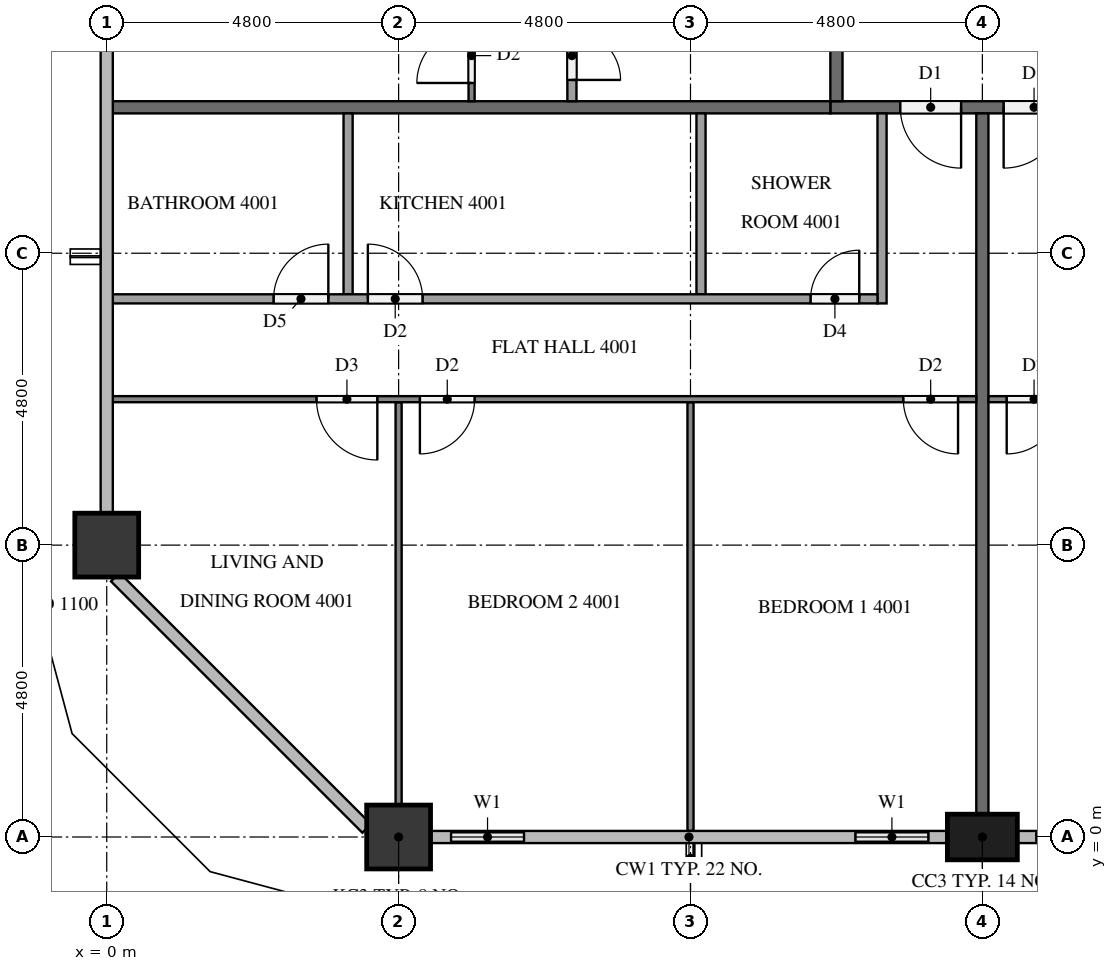
"""IFC4 building model, lengths in metres.
Left out: names, types, materials, properties, quantities, classifications, styles, units other than length and angle.
Written with IfcOpenShell. Run it as: python <this file> out.ifc"""

import sys

from ifc_helpers import new_model, si_unit, direction, frame, frame_2d, origin, origin_2d, place, context, subcontext, project, spatial, rectangle, extrude, element, fill, save


model = new_model("IFC4")
c1 = context("Model", 3, precision=1e-05, world=origin(), true_north=direction((0.0, 1.0)))
c2 = subcontext(c1, "Body", "Model", "MODEL_VIEW")
j1 = project(units=[si_unit("LENGTHUNIT", "METRE"), si_unit("PLANEANGLEUNIT", "RADIAN")], contexts=[c1])
p1 = place(None, origin())
s1 = spatial("IfcSite", under=j1, at=p1, CompositionType="ELEMENT")
p2 = place(p1, origin())
s2 = spatial("IfcBuilding", under=s1, at=p2, CompositionType="ELEMENT")
p3 = place(p2, frame((0.0, 0.0, 156.0)))
s3 = spatial("IfcBuildingStorey", under=s2, at=p3, CompositionType="ELEMENT", Elevation=156.0)
p4 = place(p3, frame((4.8, 0.0, 0.0), z_axis=(0.0, 0.0, 1.0), x_axis=(1.0, 0.0, 0.0)))
e1 = element("IfcColumn", 1, at=p4, inside=s3, PredefinedType="COLUMN", context=c2, shape_type="SweptSolid", body=[
    extrude(rectangle(XDim=1.05, YDim=1.05, at=origin_2d()), origin(), (0.0, 0.0, 1.0), 3.2),
])
p5 = place(p3, frame((14.4, 0.0, 0.0), z_axis=(0.0, 0.0, 1.0), x_axis=(1.0, 0.0, 0.0)))
e2 = element("IfcColumn", 2, at=p5, inside=s3, PredefinedType="COLUMN", context=c2, shape_type="SweptSolid", body=[
    extrude(rectangle(XDim=1.15, YDim=0.75, at=origin_2d()), origin(), (0.0, 0.0, 1.0), 3.2),
])
p6 = place(p3, frame((0.0, 4.8, 0.0), z_axis=(0.0, 0.0, 1.0), x_axis=(1.0, 0.0, 0.0)))
e3 = element("IfcColumn", 3, at=p6, inside=s3, PredefinedType="COLUMN", context=c2, shape_type="SweptSolid", body=[
    extrude(rectangle(XDim=1.05, YDim=1.05, at=origin_2d()), origin(), (0.0, 0.0, 1.0), 3.2),
])
p7 = place(p3, frame((5.325, 0.0, 0.0), z_axis=(0.0, 0.0, 1.0), x_axis=(1.0, 0.0, 0.0)))
e4 = element("IfcWall", 4, at=p7, inside=s3, PredefinedType="SOLIDWALL", context=c2, shape_type="SweptSolid", body=[
    extrude(rectangle(XDim=1.875, YDim=0.15, at=frame_2d((0.938, 0.0))), origin(), (0.0, 0.0, 1.0), 3.2),
])
p8 = place(p7, frame((0.337, 0.0, 0.9)))
e5 = element("IfcOpeningElement", 5, at=p8, cuts=e4, PredefinedType="OPENING", context=c2, shape_type="SweptSolid", body=[
    extrude(rectangle(XDim=1.2, YDim=1.4, at=frame_2d((0.6, 0.7))), frame((0.0, 0.085, 0.0), z_axis=(0.0, -1.0, 0.0), x_axis=(1.0, 0.0, 0.0)), (0.0, 0.0, 1.0), 0.17),
])
p9 = place(p3, frame((12.0, 0.0, 0.0), z_axis=(0.0, 0.0, 1.0), x_axis=(1.0, 0.0, 0.0)))
e6 = element("IfcWall", 6, at=p9, inside=s3, PredefinedType="SOLIDWALL", context=c2, shape_type="SweptSolid", body=[
    extrude(rectangle(XDim=1.825, YDim=0.15, at=frame_2d((0.913, 0.0))), origin(), (0.0, 0.0, 1.0), 3.2),
])
p10 = place(p9, frame((0.312, 0.0, 0.9)))
e7 = element("IfcOpeningElement", 7, at=p10, cuts=e6, PredefinedType="OPENING", context=c2, shape_type="SweptSolid", body=[
    extrude(rectangle(XDim=1.2, YDim=1.4, at=frame_2d((0.6, 0.7))), frame((0.0, 0.085, 0.0), z_axis=(0.0, -1.0, 0.0), x_axis=(1.0, 0.0, 0.0)), (0.0, 0.0, 1.0), 0.17),
])
p11 = place(p3, frame((14.975, 0.0, 0.0), z_axis=(0.0, 0.0, 1.0), x_axis=(1.0, 0.0, 0.0)))
e8 = element("IfcWall", 8, at=p11, inside=s3, PredefinedType="SOLIDWALL", context=c2, shape_type="SweptSolid", body=[
    extrude(rectangle(XDim=1.825, YDim=0.15, at=frame_2d((0.913, 0.0))), origin(), (0.0, 0.0, 1.0), 3.2),
])
p12 = place(p11, frame((0.312, 0.0, 0.9)))
e9 = element("IfcOpeningElement", 9, at=p12, cuts=e8, PredefinedType="OPENING", context=c2, shape_type="SweptSolid", body=[
    extrude(rectangle(XDim=1.2, YDim=1.4, at=frame_2d((0.6, 0.7))), frame((0.0, 0.085, 0.0), z_axis=(0.0, -1.0, 0.0), x_axis=(1.0, 0.0, 0.0)), (0.0, 0.0, 1.0), 0.17),
])
p13 = place(p3, frame((50.5, 12.0, 0.0), z_axis=(0.0, 0.0, 1.0), x_axis=(-1.0, 0.0, 0.0)))
e10 = element("IfcWall", 10, at=p13, inside=s3, PredefinedType="PARTITIONING", context=c2, shape_type="SweptSolid", body=[
    extrude(rectangle(XDim=38.6, YDim=0.2, at=frame_2d((19.3, 0.0))), origin(), (0.0, 0.0, 1.0), 3.2),
])
p14 = place(p13, frame((36.45, 0.0, 0.0)))
e11 = element("IfcOpeningElement", 11, at=p14, cuts=e10, PredefinedType="OPENING", context=c2, shape_type="SweptSolid", body=[
    extrude(rectangle(XDim=1.0, YDim=2.1, at=frame_2d((0.5, 1.05))), frame((0.0, 0.11, 0.0), z_axis=(0.0, -1.0, 0.0), x_axis=(1.0, 0.0, 0.0)), (0.0, 0.0, 1.0), 0.22),
])
p15 = place(p13, frame((34.75, 0.0, 0.0)))
e12 = element("IfcOpeningElement", 12, at=p15, cuts=e10, PredefinedType="OPENING", context=c2, shape_type="SweptSolid", body=[
    extrude(rectangle(XDim=1.0, YDim=2.1, at=frame_2d((0.5, 1.05))), frame((0.0, 0.11, 0.0), z_axis=(0.0, -1.0, 0.0), x_axis=(1.0, 0.0, 0.0)), (0.0, 0.0, 1.0), 0.22),
])
p16 = place(p13, frame((10.05, 0.0, 0.0)))
e13 = element("IfcOpeningElement", 13, at=p16, cuts=e10, PredefinedType="OPENING", context=c2, shape_type="SweptSolid", body=[
    extrude(rectangle(XDim=1.0, YDim=2.1, at=frame_2d((0.5, 1.05))), frame((0.0, 0.11, 0.0), z_axis=(0.0, -1.0, 0.0), x_axis=(1.0, 0.0, 0.0)), (0.0, 0.0, 1.0), 0.22),
])
p17 = place(p13, frame((8.35, 0.0, 0.0)))
e14 = element("IfcOpeningElement", 14, at=p17, cuts=e10, PredefinedType="OPENING", context=c2, shape_type="SweptSolid", body=[
    extrude(rectangle(XDim=1.0, YDim=2.1, at=frame_2d((0.5, 1.05))), frame((0.0, 0.11, 0.0), z_axis=(0.0, -1.0, 0.0), x_axis=(1.0, 0.0, 0.0)), (0.0, 0.0, 1.0), 0.22),
])
p18 = place(p3, frame((12.0, 12.1, 0.0), z_axis=(0.0, 0.0, 1.0), x_axis=(0.0, 1.0, 0.0)))
e15 = element("IfcWall", 15, at=p18, inside=s3, PredefinedType="PARTITIONING", context=c2, shape_type="SweptSolid", body=[
    extrude(rectangle(XDim=28.6, YDim=0.2, at=frame_2d((14.3, 0.0))), origin(), (0.0, 0.0, 1.0), 3.2),
])
p19 = place(p18, frame((27.35, 0.0, 0.0)))
e16 = element("IfcOpeningElement", 16, at=p19, cuts=e15, PredefinedType="OPENING", context=c2, shape_type="SweptSolid", body=[
    extrude(rectangle(XDim=1.0, YDim=2.1, at=frame_2d((0.5, 1.05))), frame((0.0, 0.11, 0.0), z_axis=(0.0, -1.0, 0.0), x_axis=(1.0, 0.0, 0.0)), (0.0, 0.0, 1.0), 0.22),
])
p20 = place(p18, frame((20.15, 0.0, 0.0)))
e17 = element("IfcOpeningElement", 17, at=p20, cuts=e15, PredefinedType="OPENING", context=c2, shape_type="SweptSolid", body=[
    extrude(rectangle(XDim=1.0, YDim=2.1, at=frame_2d((0.5, 1.05))), frame((0.0, 0.11, 0.0), z_axis=(0.0, -1.0, 0.0), x_axis=(1.0, 0.0, 0.0)), (0.0, 0.0, 1.0), 0.22),
])
p21 = place(p18, frame((10.55, 0.0, 0.0)))
e18 = element("IfcOpeningElement", 18, at=p21, cuts=e15, PredefinedType="OPENING", context=c2, shape_type="SweptSolid", body=[
    extrude(rectangle(XDim=1.0, YDim=2.1, at=frame_2d((0.5, 1.05))), frame((0.0, 0.11, 0.0), z_axis=(0.0, -1.0, 0.0), x_axis=(1.0, 0.0, 0.0)), (0.0, 0.0, 1.0), 0.22),
])
p22 = place(p3, frame((14.4, 11.9, 0.0), z_axis=(0.0, 0.0, 1.0), x_axis=(0.0, -1.0, 0.0)))
e19 = element("IfcWall", 19, at=p22, inside=s3, PredefinedType="PARTITIONING", context=c2, shape_type="SweptSolid", body=[
    extrude(rectangle(XDim=11.525, YDim=0.2, at=frame_2d((5.762, 0.0))), origin(), (0.0, 0.0, 1.0), 3.2),
])
p23 = place(p3, frame((0.1, 12.0, 0.0), z_axis=(0.0, 0.0, 1.0), x_axis=(1.0, 0.0, 0.0)))
e20 = element("IfcWall", 20, at=p23, inside=s3, PredefinedType="PARTITIONING", context=c2, shape_type="SweptSolid", body=[
    extrude(rectangle(XDim=11.8, YDim=0.2, at=frame_2d((5.9, 0.0))), origin(), (0.0, 0.0, 1.0), 3.2),
])
p24 = place(p3, frame((9.6, 7.15, 0.0), z_axis=(0.0, 0.0, 1.0), x_axis=(0.0, -1.0, 0.0)))
e21 = element("IfcWall", 21, at=p24, inside=s3, PredefinedType="PARTITIONING", context=c2, shape_type="SweptSolid", body=[
    extrude(rectangle(XDim=7.05, YDim=0.1, at=frame_2d((3.525, 0.0))), origin(), (0.0, 0.0, 1.0), 3.2),
])
p25 = place(p3, frame((4.8, 7.15, 0.0), z_axis=(0.0, 0.0, 1.0), x_axis=(0.0, -1.0, 0.0)))
e22 = element("IfcWall", 22, at=p25, inside=s3, PredefinedType="PARTITIONING", context=c2, shape_type="SweptSolid", body=[
    extrude(rectangle(XDim=6.625, YDim=0.1, at=frame_2d((3.312, 0.0))), origin(), (0.0, 0.0, 1.0), 3.2),
])
p26 = place(p3, frame((14.3, 7.2, 0.0), z_axis=(0.0, 0.0, 1.0), x_axis=(-1.0, 0.0, 0.0)))
e23 = element("IfcWall", 23, at=p26, inside=s3, PredefinedType="PARTITIONING", context=c2, shape_type="SweptSolid", body=[
    extrude(rectangle(XDim=14.2, YDim=0.1, at=frame_2d((7.1, 0.0))), origin(), (0.0, 0.0, 1.0), 3.2),
])
p27 = place(p26, frame((0.3, 0.0, 0.0)))
e24 = element("IfcOpeningElement", 24, at=p27, cuts=e23, PredefinedType="OPENING", context=c2, shape_type="SweptSolid", body=[
    extrude(rectangle(XDim=0.9, YDim=2.1, at=frame_2d((0.45, 1.05))), frame((0.0, 0.06, 0.0), z_axis=(0.0, -1.0, 0.0), x_axis=(1.0, 0.0, 0.0)), (0.0, 0.0, 1.0), 0.12),
])
p28 = place(p26, frame((8.25, 0.0, 0.0)))
e25 = element("IfcOpeningElement", 25, at=p28, cuts=e23, PredefinedType="OPENING", context=c2, shape_type="SweptSolid", body=[
    extrude(rectangle(XDim=0.9, YDim=2.1, at=frame_2d((0.45, 1.05))), frame((0.0, 0.06, 0.0), z_axis=(0.0, -1.0, 0.0), x_axis=(1.0, 0.0, 0.0)), (0.0, 0.0, 1.0), 0.12),
])
p29 = place(p26, frame((9.85, 0.0, 0.0)))
e26 = element("IfcOpeningElement", 26, at=p29, cuts=e23, PredefinedType="OPENING", context=c2, shape_type="SweptSolid", body=[
    extrude(rectangle(XDim=1.0, YDim=2.1, at=frame_2d((0.5, 1.05))), frame((0.0, 0.06, 0.0), z_axis=(0.0, -1.0, 0.0), x_axis=(1.0, 0.0, 0.0)), (0.0, 0.0, 1.0), 0.12),
])
for number, where, z_axis, x_axis in (
    (27, (9.773, 11.9, 0.0), (0.0, 0.0, 1.0), (0.0, -1.0, 0.0)),
    (28, (3.969, 11.9, 0.0), (0.0, 0.0, 1.0), (0.0, -1.0, 0.0)),
):
    element("IfcWall", number, at=place(p3, frame(where, z_axis=z_axis, x_axis=x_axis)), inside=s3, PredefinedType="PARTITIONING", context=c2, shape_type="SweptSolid", body=[
        extrude(rectangle(XDim=2.975, YDim=0.15, at=frame_2d((1.487, 0.0))), origin(), (0.0, 0.0, 1.0), 3.2),
    ])
p30 = place(p3, frame((12.75, 11.9, 0.0), z_axis=(0.0, 0.0, 1.0), x_axis=(0.0, -1.0, 0.0)))
e29 = element("IfcWall", 29, at=p30, inside=s3, PredefinedType="PARTITIONING", context=c2, shape_type="SweptSolid", body=[
    extrude(rectangle(XDim=3.125, YDim=0.15, at=frame_2d((1.562, 0.0))), origin(), (0.0, 0.0, 1.0), 3.2),
])
p31 = place(p3, frame((0.1, 8.85, 0.0), z_axis=(0.0, 0.0, 1.0), x_axis=(1.0, 0.0, 0.0)))
e30 = element("IfcWall", 30, at=p31, inside=s3, PredefinedType="PARTITIONING", context=c2, shape_type="SweptSolid", body=[
    extrude(rectangle(XDim=12.575, YDim=0.15, at=frame_2d((6.288, 0.0))), origin(), (0.0, 0.0, 1.0), 3.2),
])
p32 = place(p31, frame((11.475, 0.0, 0.0)))
e31 = element("IfcOpeningElement", 31, at=p32, cuts=e30, PredefinedType="OPENING", context=c2, shape_type="SweptSolid", body=[
    extrude(rectangle(XDim=0.8, YDim=2.1, at=frame_2d((0.4, 1.05))), frame((0.0, 0.085, 0.0), z_axis=(0.0, -1.0, 0.0), x_axis=(1.0, 0.0, 0.0)), (0.0, 0.0, 1.0), 0.17),
])
p33 = place(p31, frame((4.194, 0.0, 0.0)))
e32 = element("IfcOpeningElement", 32, at=p33, cuts=e30, PredefinedType="OPENING", context=c2, shape_type="SweptSolid", body=[
    extrude(rectangle(XDim=0.9, YDim=2.1, at=frame_2d((0.45, 1.05))), frame((0.0, 0.085, 0.0), z_axis=(0.0, -1.0, 0.0), x_axis=(1.0, 0.0, 0.0)), (0.0, 0.0, 1.0), 0.17),
])
p34 = place(p31, frame((2.644, 0.0, 0.0)))
e33 = element("IfcOpeningElement", 33, at=p34, cuts=e30, PredefinedType="OPENING", context=c2, shape_type="SweptSolid", body=[
    extrude(rectangle(XDim=0.9, YDim=2.1, at=frame_2d((0.45, 1.05))), frame((0.0, 0.085, 0.0), z_axis=(0.0, -1.0, 0.0), x_axis=(1.0, 0.0, 0.0)), (0.0, 0.0, 1.0), 0.17),
])
p35 = place(p3, frame((26.3, 7.2, 0.0), z_axis=(0.0, 0.0, 1.0), x_axis=(-1.0, 0.0, 0.0)))
e34 = element("IfcWall", 34, at=p35, inside=s3, PredefinedType="PARTITIONING", context=c2, shape_type="SweptSolid", body=[
    extrude(rectangle(XDim=11.8, YDim=0.1, at=frame_2d((5.9, 0.0))), origin(), (0.0, 0.0, 1.0), 3.2),
])
p36 = place(p35, frame((10.6, 0.0, 0.0)))
e35 = element("IfcOpeningElement", 35, at=p36, cuts=e34, PredefinedType="OPENING", context=c2, shape_type="SweptSolid", body=[
    extrude(rectangle(XDim=0.9, YDim=2.1, at=frame_2d((0.45, 1.05))), frame((0.0, 0.06, 0.0), z_axis=(0.0, -1.0, 0.0), x_axis=(1.0, 0.0, 0.0)), (0.0, 0.0, 1.0), 0.12),
])
p37 = place(p35, frame((0.3, 0.0, 0.0)))
e36 = element("IfcOpeningElement", 36, at=p37, cuts=e34, PredefinedType="OPENING", context=c2, shape_type="SweptSolid", body=[
    extrude(rectangle(XDim=1.0, YDim=2.1, at=frame_2d((0.5, 1.05))), frame((0.0, 0.06, 0.0), z_axis=(0.0, -1.0, 0.0), x_axis=(1.0, 0.0, 0.0)), (0.0, 0.0, 1.0), 0.12),
])
p38 = place(p3, frame((6.0, 12.1, 0.0), z_axis=(0.0, 0.0, 1.0), x_axis=(0.0, 1.0, 0.0)))
e37 = element("IfcWall", 37, at=p38, inside=s3, PredefinedType="PARTITIONING", context=c2, shape_type="SweptSolid", body=[
    extrude(rectangle(XDim=11.8, YDim=0.1, at=frame_2d((5.9, 0.0))), origin(), (0.0, 0.0, 1.0), 3.2),
])
p39 = place(p38, frame((10.5, 0.0, 0.0)))
e38 = element("IfcOpeningElement", 38, at=p39, cuts=e37, PredefinedType="OPENING", context=c2, shape_type="SweptSolid", body=[
    extrude(rectangle(XDim=1.0, YDim=2.1, at=frame_2d((0.5, 1.05))), frame((0.0, 0.06, 0.0), z_axis=(0.0, -1.0, 0.0), x_axis=(1.0, 0.0, 0.0)), (0.0, 0.0, 1.0), 0.12),
])
p40 = place(p38, frame((0.3, 0.0, 0.0)))
e39 = element("IfcOpeningElement", 39, at=p40, cuts=e37, PredefinedType="OPENING", context=c2, shape_type="SweptSolid", body=[
    extrude(rectangle(XDim=0.9, YDim=2.1, at=frame_2d((0.45, 1.05))), frame((0.0, 0.06, 0.0), z_axis=(0.0, -1.0, 0.0), x_axis=(1.0, 0.0, 0.0)), (0.0, 0.0, 1.0), 0.12),
])
p41 = place(p3, frame((7.65, 22.275, 0.0), z_axis=(0.0, 0.0, 1.0), x_axis=(0.0, -1.0, 0.0)))
e40 = element("IfcWall", 40, at=p41, inside=s3, PredefinedType="PARTITIONING", context=c2, shape_type="SweptSolid", body=[
    extrude(rectangle(XDim=10.175, YDim=0.15, at=frame_2d((5.087, 0.0))), origin(), (0.0, 0.0, 1.0), 3.2),
])
p42 = place(p41, frame((0.3, 0.0, 0.0)))
e41 = element("IfcOpeningElement", 41, at=p42, cuts=e40, PredefinedType="OPENING", context=c2, shape_type="SweptSolid", body=[
    extrude(rectangle(XDim=0.9, YDim=2.1, at=frame_2d((0.45, 1.05))), frame((0.0, 0.085, 0.0), z_axis=(0.0, -1.0, 0.0), x_axis=(1.0, 0.0, 0.0)), (0.0, 0.0, 1.0), 0.17),
])
p43 = place(p41, frame((9.025, 0.0, 0.0)))
e42 = element("IfcOpeningElement", 42, at=p43, cuts=e40, PredefinedType="OPENING", context=c2, shape_type="SweptSolid", body=[
    extrude(rectangle(XDim=0.8, YDim=2.1, at=frame_2d((0.4, 1.05))), frame((0.0, 0.085, 0.0), z_axis=(0.0, -1.0, 0.0), x_axis=(1.0, 0.0, 0.0)), (0.0, 0.0, 1.0), 0.17),
])
p44 = place(p8, origin())
e43 = element("IfcWindow", 43, at=p44, inside=s3, PartitioningType="SINGLE_PANEL", PredefinedType="WINDOW", context=c2, shape_type="SweptSolid", body=[
    extrude(rectangle(XDim=1.2, YDim=1.4, at=frame_2d((0.6, 0.7))), frame((0.0, 0.03, 0.0), z_axis=(0.0, -1.0, 0.0), x_axis=(1.0, 0.0, 0.0)), (0.0, 0.0, 1.0), 0.06),
])
fill(e5, e43)
p45 = place(p10, origin())
e44 = element("IfcWindow", 44, at=p45, inside=s3, PartitioningType="SINGLE_PANEL", PredefinedType="WINDOW", context=c2, shape_type="SweptSolid", body=[
    extrude(rectangle(XDim=1.2, YDim=1.4, at=frame_2d((0.6, 0.7))), frame((0.0, 0.03, 0.0), z_axis=(0.0, -1.0, 0.0), x_axis=(1.0, 0.0, 0.0)), (0.0, 0.0, 1.0), 0.06),
])
fill(e7, e44)
p46 = place(p12, origin())
e45 = element("IfcWindow", 45, at=p46, inside=s3, PartitioningType="SINGLE_PANEL", PredefinedType="WINDOW", context=c2, shape_type="SweptSolid", body=[
    extrude(rectangle(XDim=1.2, YDim=1.4, at=frame_2d((0.6, 0.7))), frame((0.0, 0.03, 0.0), z_axis=(0.0, -1.0, 0.0), x_axis=(1.0, 0.0, 0.0)), (0.0, 0.0, 1.0), 0.06),
])
fill(e9, e45)
p47 = place(p14, origin())
e46 = element("IfcDoor", 46, at=p47, inside=s3, OperationType="SINGLE_SWING_LEFT", PredefinedType="DOOR", context=c2, shape_type="SweptSolid", body=[
    extrude(rectangle(XDim=1.0, YDim=2.1, at=frame_2d((0.5, 1.05))), frame((0.0, 0.025, 0.0), z_axis=(0.0, -1.0, 0.0), x_axis=(1.0, 0.0, 0.0)), (0.0, 0.0, 1.0), 0.05),
])
fill(e11, e46)
p48 = place(p15, origin())
e47 = element("IfcDoor", 47, at=p48, inside=s3, OperationType="SINGLE_SWING_RIGHT", PredefinedType="DOOR", context=c2, shape_type="SweptSolid", body=[
    extrude(rectangle(XDim=1.0, YDim=2.1, at=frame_2d((0.5, 1.05))), frame((0.0, 0.025, 0.0), z_axis=(0.0, -1.0, 0.0), x_axis=(1.0, 0.0, 0.0)), (0.0, 0.0, 1.0), 0.05),
])
fill(e12, e47)
p49 = place(p27, origin())
e48 = element("IfcDoor", 48, at=p49, inside=s3, OperationType="SINGLE_SWING_LEFT", PredefinedType="DOOR", context=c2, shape_type="SweptSolid", body=[
    extrude(rectangle(XDim=0.9, YDim=2.1, at=frame_2d((0.45, 1.05))), frame((0.0, 0.025, 0.0), z_axis=(0.0, -1.0, 0.0), x_axis=(1.0, 0.0, 0.0)), (0.0, 0.0, 1.0), 0.05),
])
fill(e24, e48)
p50 = place(p28, origin())
e49 = element("IfcDoor", 49, at=p50, inside=s3, OperationType="SINGLE_SWING_RIGHT", PredefinedType="DOOR", context=c2, shape_type="SweptSolid", body=[
    extrude(rectangle(XDim=0.9, YDim=2.1, at=frame_2d((0.45, 1.05))), frame((0.0, 0.025, 0.0), z_axis=(0.0, -1.0, 0.0), x_axis=(1.0, 0.0, 0.0)), (0.0, 0.0, 1.0), 0.05),
])
fill(e25, e49)
p51 = place(p29, origin())
e50 = element("IfcDoor", 50, at=p51, inside=s3, OperationType="SINGLE_SWING_LEFT", PredefinedType="DOOR", context=c2, shape_type="SweptSolid", body=[
    extrude(rectangle(XDim=1.0, YDim=2.1, at=frame_2d((0.5, 1.05))), frame((0.0, 0.025, 0.0), z_axis=(0.0, -1.0, 0.0), x_axis=(1.0, 0.0, 0.0)), (0.0, 0.0, 1.0), 0.05),
])
fill(e26, e50)
p52 = place(p32, origin())
e51 = element("IfcDoor", 51, at=p52, inside=s3, OperationType="SINGLE_SWING_RIGHT", PredefinedType="DOOR", context=c2, shape_type="SweptSolid", body=[
    extrude(rectangle(XDim=0.8, YDim=2.1, at=frame_2d((0.4, 1.05))), frame((0.0, 0.025, 0.0), z_axis=(0.0, -1.0, 0.0), x_axis=(1.0, 0.0, 0.0)), (0.0, 0.0, 1.0), 0.05),
])
fill(e31, e51)
p53 = place(p33, origin())
e52 = element("IfcDoor", 52, at=p53, inside=s3, OperationType="SINGLE_SWING_LEFT", PredefinedType="DOOR", context=c2, shape_type="SweptSolid", body=[
    extrude(rectangle(XDim=0.9, YDim=2.1, at=frame_2d((0.45, 1.05))), frame((0.0, 0.025, 0.0), z_axis=(0.0, -1.0, 0.0), x_axis=(1.0, 0.0, 0.0)), (0.0, 0.0, 1.0), 0.05),
])
fill(e32, e52)
p54 = place(p34, origin())
e53 = element("IfcDoor", 53, at=p54, inside=s3, OperationType="SINGLE_SWING_RIGHT", PredefinedType="DOOR", context=c2, shape_type="SweptSolid", body=[
    extrude(rectangle(XDim=0.9, YDim=2.1, at=frame_2d((0.45, 1.05))), frame((0.0, 0.025, 0.0), z_axis=(0.0, -1.0, 0.0), x_axis=(1.0, 0.0, 0.0)), (0.0, 0.0, 1.0), 0.05),
])
fill(e33, e53)
p55 = place(p36, origin())
e54 = element("IfcDoor", 54, at=p55, inside=s3, OperationType="SINGLE_SWING_RIGHT", PredefinedType="DOOR", context=c2, shape_type="SweptSolid", body=[
    extrude(rectangle(XDim=0.9, YDim=2.1, at=frame_2d((0.45, 1.05))), frame((0.0, 0.025, 0.0), z_axis=(0.0, -1.0, 0.0), x_axis=(1.0, 0.0, 0.0)), (0.0, 0.0, 1.0), 0.05),
])
fill(e35, e54)
p56 = place(p40, origin())
e55 = element("IfcDoor", 55, at=p56, inside=s3, OperationType="SINGLE_SWING_LEFT", PredefinedType="DOOR", context=c2, shape_type="SweptSolid", body=[
    extrude(rectangle(XDim=0.9, YDim=2.1, at=frame_2d((0.45, 1.05))), frame((0.0, 0.025, 0.0), z_axis=(0.0, -1.0, 0.0), x_axis=(1.0, 0.0, 0.0)), (0.0, 0.0, 1.0), 0.05),
])
fill(e39, e55)
p57 = place(p43, origin())
e56 = element("IfcDoor", 56, at=p57, inside=s3, OperationType="SINGLE_SWING_RIGHT", PredefinedType="DOOR", context=c2, shape_type="SweptSolid", body=[
    extrude(rectangle(XDim=0.8, YDim=2.1, at=frame_2d((0.4, 1.05))), frame((0.0, 0.025, 0.0), z_axis=(0.0, -1.0, 0.0), x_axis=(1.0, 0.0, 0.0)), (0.0, 0.0, 1.0), 0.05),
])
fill(e42, e56)
save(model, sys.argv[1])
